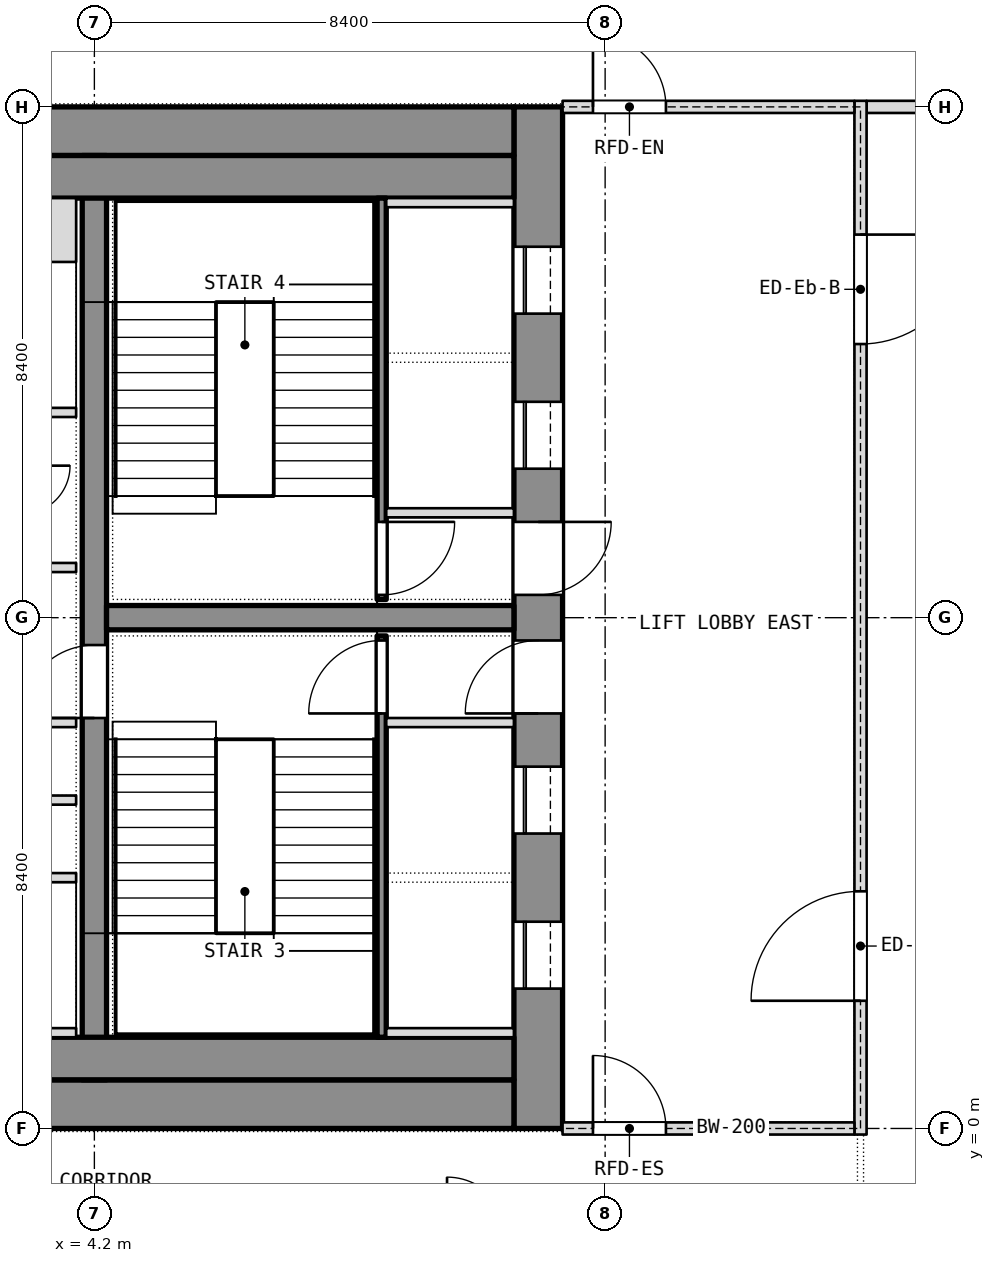
"""IFC4 building model, lengths in metres.
Left out: names, types, materials, properties, quantities, classifications, styles, units other than length and angle.
Written with IfcOpenShell. Run it as: python <this file> out.ifc"""

import sys

from ifc_helpers import new_model, si_unit, direction, frame, frame_2d, origin, place, context, subcontext, project, spatial, rectangle, extrude, element, fill, save


model = new_model("IFC4")
c1 = context("Model", 3, precision=1e-05, world=origin(), true_north=direction((0.0, 1.0)))
c2 = subcontext(c1, "Body", "Model", "MODEL_VIEW")
j1 = project(units=[si_unit("LENGTHUNIT", "METRE"), si_unit("PLANEANGLEUNIT", "RADIAN")], contexts=[c1])
p1 = place(None, origin())
s1 = spatial("IfcSite", under=j1, at=p1, CompositionType="ELEMENT")
p2 = place(p1, origin())
s2 = spatial("IfcBuilding", under=s1, at=p2, CompositionType="ELEMENT")
p3 = place(p2, frame((0.0, 0.0, 216.5)))
s3 = spatial("IfcBuildingStorey", under=s2, at=p3, CompositionType="ELEMENT", Elevation=216.5)
p4 = place(p3, frame((11.5, 0.0, 0.0), z_axis=(0.0, 0.0, 1.0), x_axis=(0.0, 1.0, 0.0)))
e1 = element("IfcWall", 1, at=p4, inside=s3, PredefinedType="SHEAR", context=c2, shape_type="SweptSolid", body=[
    extrude(rectangle(XDim=16.8, YDim=0.8, at=frame_2d((8.4, 0.0))), origin(), (0.0, 0.0, 1.0), 3.6),
])
p5 = place(p4, frame((2.3, 0.0, 0.0)))
e2 = element("IfcOpeningElement", 2, at=p5, cuts=e1, PredefinedType="OPENING", context=c2, shape_type="SweptSolid", body=[
    extrude(rectangle(XDim=1.1, YDim=2.1, at=frame_2d((0.55, 1.05))), frame((0.0, 0.4, 0.0), z_axis=(0.0, -1.0, 0.0), x_axis=(1.0, 0.0, 0.0)), (0.0, 0.0, 1.0), 0.8),
])
p6 = place(p4, frame((4.85, 0.0, 0.0)))
e3 = element("IfcOpeningElement", 3, at=p6, cuts=e1, PredefinedType="OPENING", context=c2, shape_type="SweptSolid", body=[
    extrude(rectangle(XDim=1.1, YDim=2.1, at=frame_2d((0.55, 1.05))), frame((0.0, 0.4, 0.0), z_axis=(0.0, -1.0, 0.0), x_axis=(1.0, 0.0, 0.0)), (0.0, 0.0, 1.0), 0.8),
])
p7 = place(p4, frame((6.825, 0.0, 0.0)))
e4 = element("IfcOpeningElement", 4, at=p7, cuts=e1, PredefinedType="OPENING", context=c2, shape_type="SweptSolid", body=[
    extrude(rectangle(XDim=1.2, YDim=2.1, at=frame_2d((0.6, 1.05))), frame((0.0, 0.4, 0.0), z_axis=(0.0, -1.0, 0.0), x_axis=(1.0, 0.0, 0.0)), (0.0, 0.0, 1.0), 0.8),
])
p8 = place(p4, frame((13.4, 0.0, 0.0)))
e5 = element("IfcOpeningElement", 5, at=p8, cuts=e1, PredefinedType="OPENING", context=c2, shape_type="SweptSolid", body=[
    extrude(rectangle(XDim=1.1, YDim=2.1, at=frame_2d((0.55, 1.05))), frame((0.0, 0.4, 0.0), z_axis=(0.0, -1.0, 0.0), x_axis=(1.0, 0.0, 0.0)), (0.0, 0.0, 1.0), 0.8),
])
p9 = place(p4, frame((10.85, 0.0, 0.0)))
e6 = element("IfcOpeningElement", 6, at=p9, cuts=e1, PredefinedType="OPENING", context=c2, shape_type="SweptSolid", body=[
    extrude(rectangle(XDim=1.1, YDim=2.1, at=frame_2d((0.55, 1.05))), frame((0.0, 0.4, 0.0), z_axis=(0.0, -1.0, 0.0), x_axis=(1.0, 0.0, 0.0)), (0.0, 0.0, 1.0), 0.8),
])
p10 = place(p4, frame((8.775, 0.0, 0.0)))
e7 = element("IfcOpeningElement", 7, at=p10, cuts=e1, PredefinedType="OPENING", context=c2, shape_type="SweptSolid", body=[
    extrude(rectangle(XDim=1.2, YDim=2.1, at=frame_2d((0.6, 1.05))), frame((0.0, 0.4, 0.0), z_axis=(0.0, -1.0, 0.0), x_axis=(1.0, 0.0, 0.0)), (0.0, 0.0, 1.0), 0.8),
])
p11 = place(p3, frame((-11.1, 0.4, 0.0), z_axis=(0.0, 0.0, 1.0), x_axis=(1.0, 0.0, 0.0)))
e8 = element("IfcWall", 8, at=p11, inside=s3, PredefinedType="SHEAR", context=c2, shape_type="SweptSolid", body=[
    extrude(rectangle(XDim=22.2, YDim=0.8, at=frame_2d((11.1, 0.0))), origin(), (0.0, 0.0, 1.0), 3.6),
])
p12 = place(p11, frame((10.85, 0.0, 0.0)))
e9 = element("IfcOpeningElement", 9, at=p12, cuts=e8, PredefinedType="OPENING", context=c2, shape_type="SweptSolid", body=[
    extrude(rectangle(XDim=1.4, YDim=2.1, at=frame_2d((0.7, 1.05))), frame((0.0, 0.4, 0.0), z_axis=(0.0, -1.0, 0.0), x_axis=(1.0, 0.0, 0.0)), (0.0, 0.0, 1.0), 0.8),
])
p13 = place(p3, frame((-11.1, 16.4, 0.0), z_axis=(0.0, 0.0, 1.0), x_axis=(1.0, 0.0, 0.0)))
e10 = element("IfcWall", 10, at=p13, inside=s3, PredefinedType="SHEAR", context=c2, shape_type="SweptSolid", body=[
    extrude(rectangle(XDim=22.2, YDim=0.8, at=frame_2d((11.1, 0.0))), origin(), (0.0, 0.0, 1.0), 3.6),
])
p14 = place(p13, frame((10.4, 0.0, 0.0)))
e11 = element("IfcOpeningElement", 11, at=p14, cuts=e10, PredefinedType="OPENING", context=c2, shape_type="SweptSolid", body=[
    extrude(rectangle(XDim=1.4, YDim=2.1, at=frame_2d((0.7, 1.05))), frame((0.0, 0.4, 0.0), z_axis=(0.0, -1.0, 0.0), x_axis=(1.0, 0.0, 0.0)), (0.0, 0.0, 1.0), 0.8),
])
p15 = place(p3, frame((4.2, 0.8, 0.0), z_axis=(0.0, 0.0, 1.0), x_axis=(0.0, 1.0, 0.0)))
e12 = element("IfcWall", 12, at=p15, inside=s3, PredefinedType="SHEAR", context=c2, shape_type="SweptSolid", body=[
    extrude(rectangle(XDim=15.2, YDim=0.4, at=frame_2d((7.6, 0.0))), origin(), (0.0, 0.0, 1.0), 3.6),
])
p16 = place(p15, frame((5.95, 0.0, 0.0)))
e13 = element("IfcOpeningElement", 13, at=p16, cuts=e12, PredefinedType="OPENING", context=c2, shape_type="SweptSolid", body=[
    extrude(rectangle(XDim=1.2, YDim=2.1, at=frame_2d((0.6, 1.05))), frame((0.0, 0.2, 0.0), z_axis=(0.0, -1.0, 0.0), x_axis=(1.0, 0.0, 0.0)), (0.0, 0.0, 1.0), 0.4),
])
p17 = place(p3, frame((4.4, 8.4, 0.0), z_axis=(0.0, 0.0, 1.0), x_axis=(1.0, 0.0, 0.0)))
e14 = element("IfcWall", 14, at=p17, inside=s3, PredefinedType="SHEAR", context=c2, shape_type="SweptSolid", body=[
    extrude(rectangle(XDim=6.7, YDim=0.4, at=frame_2d((3.35, 0.0))), origin(), (0.0, 0.0, 1.0), 3.6),
])
p18 = place(p3, frame((16.9, 16.8, 0.0), z_axis=(0.0, 0.0, 1.0), x_axis=(1.0, 0.0, 0.0)))
e15 = element("IfcWall", 15, at=p18, inside=s3, PredefinedType="PARTITIONING", context=c2, shape_type="SweptSolid", body=[
    extrude(rectangle(XDim=1.5, YDim=0.2, at=frame_2d((0.75, 0.0))), origin(), (0.0, 0.0, 1.0), 2.94),
])
p19 = place(p3, frame((1.15, 1.15, 0.0), z_axis=(0.0, 0.0, 1.0), x_axis=(1.0, 0.0, 0.0)))
e16 = element("IfcWall", 16, at=p19, inside=s3, PredefinedType="PARTITIONING", context=c2, shape_type="SweptSolid", body=[
    extrude(rectangle(XDim=9.95, YDim=0.7, at=frame_2d((4.975, 0.0))), origin(), (0.0, 0.0, 1.0), 3.34),
])
p20 = place(p3, frame((0.9, 15.65, 0.0), z_axis=(0.0, 0.0, 1.0), x_axis=(1.0, 0.0, 0.0)))
e17 = element("IfcWall", 17, at=p20, inside=s3, PredefinedType="PARTITIONING", context=c2, shape_type="SweptSolid", body=[
    extrude(rectangle(XDim=10.2, YDim=0.7, at=frame_2d((5.1, 0.0))), origin(), (0.0, 0.0, 1.0), 3.34),
])
p21 = place(p3, frame((8.925, 1.5, 0.0), z_axis=(0.0, 0.0, 1.0), x_axis=(0.0, 1.0, 0.0)))
e18 = element("IfcWall", 18, at=p21, inside=s3, PredefinedType="SHEAR", context=c2, shape_type="SweptSolid", body=[
    extrude(rectangle(XDim=6.6, YDim=0.15, at=frame_2d((3.3, 0.0))), origin(), (0.0, 0.0, 1.0), 3.34),
])
p22 = place(p21, frame((5.325, 0.0, 0.0)))
e19 = element("IfcOpeningElement", 19, at=p22, cuts=e18, PredefinedType="OPENING", context=c2, shape_type="SweptSolid", body=[
    extrude(rectangle(XDim=1.2, YDim=2.1, at=frame_2d((0.6, 1.05))), frame((0.0, 0.075, 0.0), z_axis=(0.0, -1.0, 0.0), x_axis=(1.0, 0.0, 0.0)), (0.0, 0.0, 1.0), 0.15),
])
for number, where, z_axis, x_axis in (
    (20, (9.0, 6.675, 0.0), (0.0, 0.0, 1.0), (1.0, 0.0, 0.0)),
    (21, (9.0, 1.575, 0.0), (0.0, 0.0, 1.0), (1.0, 0.0, 0.0)),
):
    element("IfcWall", number, at=place(p3, frame(where, z_axis=z_axis, x_axis=x_axis)), inside=s3, PredefinedType="SHEAR", context=c2, shape_type="SweptSolid", body=[
        extrude(rectangle(XDim=2.1, YDim=0.15, at=frame_2d((1.05, 0.0))), origin(), (0.0, 0.0, 1.0), 3.6),
    ])
p23 = place(p3, frame((8.925, 8.7, 0.0), z_axis=(0.0, 0.0, 1.0), x_axis=(0.0, 1.0, 0.0)))
e22 = element("IfcWall", 22, at=p23, inside=s3, PredefinedType="SHEAR", context=c2, shape_type="SweptSolid", body=[
    extrude(rectangle(XDim=6.6, YDim=0.15, at=frame_2d((3.3, 0.0))), origin(), (0.0, 0.0, 1.0), 3.34),
])
p24 = place(p23, frame((0.075, 0.0, 0.0)))
e23 = element("IfcOpeningElement", 23, at=p24, cuts=e22, PredefinedType="OPENING", context=c2, shape_type="SweptSolid", body=[
    extrude(rectangle(XDim=1.2, YDim=2.1, at=frame_2d((0.6, 1.05))), frame((0.0, 0.075, 0.0), z_axis=(0.0, -1.0, 0.0), x_axis=(1.0, 0.0, 0.0)), (0.0, 0.0, 1.0), 0.15),
])
for number, where, z_axis, x_axis in (
    (24, (9.0, 10.125, 0.0), (0.0, 0.0, 1.0), (1.0, 0.0, 0.0)),
    (25, (9.0, 15.225, 0.0), (0.0, 0.0, 1.0), (1.0, 0.0, 0.0)),
):
    element("IfcWall", number, at=place(p3, frame(where, z_axis=z_axis, x_axis=x_axis)), inside=s3, PredefinedType="SHEAR", context=c2, shape_type="SweptSolid", body=[
        extrude(rectangle(XDim=2.1, YDim=0.15, at=frame_2d((1.05, 0.0))), origin(), (0.0, 0.0, 1.0), 3.6),
    ])
p25 = place(p3, frame((-3.9, 4.125, 0.0), z_axis=(0.0, 0.0, 1.0), x_axis=(1.0, 0.0, 0.0)))
e26 = element("IfcWall", 26, at=p25, inside=s3, PredefinedType="PARTITIONING", context=c2, shape_type="SweptSolid", body=[
    extrude(rectangle(XDim=7.8, YDim=0.15, at=frame_2d((3.9, 0.0))), origin(), (0.0, 0.0, 1.0), 3.34),
])
p26 = place(p25, frame((3.75, 0.0, 0.0)))
e27 = element("IfcOpeningElement", 27, at=p26, cuts=e26, PredefinedType="OPENING", context=c2, shape_type="SweptSolid", body=[
    extrude(rectangle(XDim=1.2, YDim=2.1, at=frame_2d((0.6, 1.05))), frame((0.0, 0.075, 0.0), z_axis=(0.0, -1.0, 0.0), x_axis=(1.0, 0.0, 0.0)), (0.0, 0.0, 1.0), 0.15),
])
p27 = place(p3, frame((-3.9, 11.775, 0.0), z_axis=(0.0, 0.0, 1.0), x_axis=(1.0, 0.0, 0.0)))
e28 = element("IfcWall", 28, at=p27, inside=s3, PredefinedType="PARTITIONING", context=c2, shape_type="SweptSolid", body=[
    extrude(rectangle(XDim=7.8, YDim=0.15, at=frame_2d((3.9, 0.0))), origin(), (0.0, 0.0, 1.0), 3.34),
])
p28 = place(p27, frame((3.3, 0.0, 0.0)))
e29 = element("IfcOpeningElement", 29, at=p28, cuts=e28, PredefinedType="OPENING", context=c2, shape_type="SweptSolid", body=[
    extrude(rectangle(XDim=1.2, YDim=2.1, at=frame_2d((0.6, 1.05))), frame((0.0, 0.075, 0.0), z_axis=(0.0, -1.0, 0.0), x_axis=(1.0, 0.0, 0.0)), (0.0, 0.0, 1.0), 0.15),
])
p29 = place(p3, frame((1.65, 1.575, 0.0), z_axis=(0.0, 0.0, 1.0), x_axis=(1.0, 0.0, 0.0)))
e30 = element("IfcWall", 30, at=p29, inside=s3, PredefinedType="SHEAR", context=c2, shape_type="SweptSolid", body=[
    extrude(rectangle(XDim=2.25, YDim=0.15, at=frame_2d((1.125, 0.0))), origin(), (0.0, 0.0, 1.0), 3.6),
])
p30 = place(p3, frame((1.65, 14.775, 0.0), z_axis=(0.0, 0.0, 1.0), x_axis=(1.0, 0.0, 0.0)))
e31 = element("IfcWall", 31, at=p30, inside=s3, PredefinedType="SHEAR", context=c2, shape_type="SweptSolid", body=[
    extrude(rectangle(XDim=2.25, YDim=1.05, at=frame_2d((1.125, 0.0))), origin(), (0.0, 0.0, 1.0), 3.6),
])
for number, where, z_axis, x_axis in (
    (32, (1.65, 6.675, 0.0), (0.0, 0.0, 1.0), (1.0, 0.0, 0.0)),
    (33, (1.65, 9.225, 0.0), (0.0, 0.0, 1.0), (1.0, 0.0, 0.0)),
):
    element("IfcWall", number, at=place(p3, frame(where, z_axis=z_axis, x_axis=x_axis)), inside=s3, PredefinedType="PARTITIONING", context=c2, shape_type="SweptSolid", body=[
        extrude(rectangle(XDim=2.25, YDim=0.15, at=frame_2d((1.125, 0.0))), origin(), (0.0, 0.0, 1.0), 3.34),
    ])
p31 = place(p3, frame((1.8, 5.4, 0.0), z_axis=(0.0, 0.0, 1.0), x_axis=(1.0, 0.0, 0.0)))
e34 = element("IfcWall", 34, at=p31, inside=s3, PredefinedType="PARTITIONING", context=c2, shape_type="SweptSolid", body=[
    extrude(rectangle(XDim=2.1, YDim=0.15, at=frame_2d((1.05, 0.0))), origin(), (0.0, 0.0, 1.0), 3.34),
])
p32 = place(p3, frame((16.8, -0.1, 0.0), z_axis=(0.0, 0.0, 1.0), x_axis=(0.0, 1.0, 0.0)))
e35 = element("IfcWall", 35, at=p32, inside=s3, PredefinedType="PARTITIONING", context=c2, shape_type="SweptSolid", body=[
    extrude(rectangle(XDim=17.0, YDim=0.2, at=frame_2d((8.5, 0.0))), origin(), (0.0, 0.0, 1.0), 3.34),
])
p33 = place(p32, frame((2.2, 0.0, 0.0)))
e36 = element("IfcOpeningElement", 36, at=p33, cuts=e35, PredefinedType="OPENING", context=c2, shape_type="SweptSolid", body=[
    extrude(rectangle(XDim=1.8, YDim=2.1, at=frame_2d((0.9, 1.05))), frame((0.0, 0.1, 0.0), z_axis=(0.0, -1.0, 0.0), x_axis=(1.0, 0.0, 0.0)), (0.0, 0.0, 1.0), 0.2),
])
p34 = place(p32, frame((13.0, 0.0, 0.0)))
e37 = element("IfcOpeningElement", 37, at=p34, cuts=e35, PredefinedType="OPENING", context=c2, shape_type="SweptSolid", body=[
    extrude(rectangle(XDim=1.8, YDim=2.1, at=frame_2d((0.9, 1.05))), frame((0.0, 0.1, 0.0), z_axis=(0.0, -1.0, 0.0), x_axis=(1.0, 0.0, 0.0)), (0.0, 0.0, 1.0), 0.2),
])
p35 = place(p3, frame((11.9, 0.0, 0.0), z_axis=(0.0, 0.0, 1.0), x_axis=(1.0, 0.0, 0.0)))
e38 = element("IfcWall", 38, at=p35, inside=s3, PredefinedType="PARTITIONING", context=c2, shape_type="SweptSolid", body=[
    extrude(rectangle(XDim=4.8, YDim=0.2, at=frame_2d((2.4, 0.0))), origin(), (0.0, 0.0, 1.0), 2.94),
])
p36 = place(p35, frame((0.5, 0.0, 0.0)))
e39 = element("IfcOpeningElement", 39, at=p36, cuts=e38, PredefinedType="OPENING", context=c2, shape_type="SweptSolid", body=[
    extrude(rectangle(XDim=1.2, YDim=2.1, at=frame_2d((0.6, 1.05))), frame((0.0, 0.1, 0.0), z_axis=(0.0, -1.0, 0.0), x_axis=(1.0, 0.0, 0.0)), (0.0, 0.0, 1.0), 0.2),
])
p37 = place(p3, frame((11.9, 16.8, 0.0), z_axis=(0.0, 0.0, 1.0), x_axis=(1.0, 0.0, 0.0)))
e40 = element("IfcWall", 40, at=p37, inside=s3, PredefinedType="PARTITIONING", context=c2, shape_type="SweptSolid", body=[
    extrude(rectangle(XDim=4.8, YDim=0.2, at=frame_2d((2.4, 0.0))), origin(), (0.0, 0.0, 1.0), 2.94),
])
p38 = place(p37, frame((0.5, 0.0, 0.0)))
e41 = element("IfcOpeningElement", 41, at=p38, cuts=e40, PredefinedType="OPENING", context=c2, shape_type="SweptSolid", body=[
    extrude(rectangle(XDim=1.2, YDim=2.1, at=frame_2d((0.6, 1.05))), frame((0.0, 0.1, 0.0), z_axis=(0.0, -1.0, 0.0), x_axis=(1.0, 0.0, 0.0)), (0.0, 0.0, 1.0), 0.2),
])
p39 = place(p5, origin())
e42 = element("IfcDoor", 42, at=p39, inside=s3, OperationType="SLIDING_TO_LEFT", PredefinedType="DOOR", context=c2, shape_type="SweptSolid", body=[
    extrude(rectangle(XDim=1.1, YDim=2.1, at=frame_2d((0.55, 1.05))), frame((0.0, 0.025, 0.0), z_axis=(0.0, -1.0, 0.0), x_axis=(1.0, 0.0, 0.0)), (0.0, 0.0, 1.0), 0.05),
])
fill(e2, e42)
p40 = place(p6, origin())
e43 = element("IfcDoor", 43, at=p40, inside=s3, OperationType="SLIDING_TO_LEFT", PredefinedType="DOOR", context=c2, shape_type="SweptSolid", body=[
    extrude(rectangle(XDim=1.1, YDim=2.1, at=frame_2d((0.55, 1.05))), frame((0.0, 0.025, 0.0), z_axis=(0.0, -1.0, 0.0), x_axis=(1.0, 0.0, 0.0)), (0.0, 0.0, 1.0), 0.05),
])
fill(e3, e43)
p41 = place(p7, origin())
e44 = element("IfcDoor", 44, at=p41, inside=s3, OperationType="SINGLE_SWING_LEFT", PredefinedType="DOOR", context=c2, shape_type="SweptSolid", body=[
    extrude(rectangle(XDim=1.2, YDim=2.1, at=frame_2d((0.6, 1.05))), frame((0.0, 0.025, 0.0), z_axis=(0.0, -1.0, 0.0), x_axis=(1.0, 0.0, 0.0)), (0.0, 0.0, 1.0), 0.05),
])
fill(e4, e44)
p42 = place(p22, origin())
e45 = element("IfcDoor", 45, at=p42, inside=s3, OperationType="SINGLE_SWING_LEFT", PredefinedType="DOOR", context=c2, shape_type="SweptSolid", body=[
    extrude(rectangle(XDim=1.2, YDim=2.1, at=frame_2d((0.6, 1.05))), frame((0.0, 0.025, 0.0), z_axis=(0.0, -1.0, 0.0), x_axis=(1.0, 0.0, 0.0)), (0.0, 0.0, 1.0), 0.05),
])
fill(e19, e45)
p43 = place(p8, origin())
e46 = element("IfcDoor", 46, at=p43, inside=s3, OperationType="SLIDING_TO_LEFT", PredefinedType="DOOR", context=c2, shape_type="SweptSolid", body=[
    extrude(rectangle(XDim=1.1, YDim=2.1, at=frame_2d((0.55, 1.05))), frame((0.0, 0.025, 0.0), z_axis=(0.0, -1.0, 0.0), x_axis=(1.0, 0.0, 0.0)), (0.0, 0.0, 1.0), 0.05),
])
fill(e5, e46)
p44 = place(p9, origin())
e47 = element("IfcDoor", 47, at=p44, inside=s3, OperationType="SLIDING_TO_LEFT", PredefinedType="DOOR", context=c2, shape_type="SweptSolid", body=[
    extrude(rectangle(XDim=1.1, YDim=2.1, at=frame_2d((0.55, 1.05))), frame((0.0, 0.025, 0.0), z_axis=(0.0, -1.0, 0.0), x_axis=(1.0, 0.0, 0.0)), (0.0, 0.0, 1.0), 0.05),
])
fill(e6, e47)
p45 = place(p10, origin())
e48 = element("IfcDoor", 48, at=p45, inside=s3, OperationType="SINGLE_SWING_LEFT", PredefinedType="DOOR", context=c2, shape_type="SweptSolid", body=[
    extrude(rectangle(XDim=1.2, YDim=2.1, at=frame_2d((0.6, 1.05))), frame((0.0, 0.025, 0.0), z_axis=(0.0, -1.0, 0.0), x_axis=(1.0, 0.0, 0.0)), (0.0, 0.0, 1.0), 0.05),
])
fill(e7, e48)
p46 = place(p24, origin())
e49 = element("IfcDoor", 49, at=p46, inside=s3, OperationType="SINGLE_SWING_LEFT", PredefinedType="DOOR", context=c2, shape_type="SweptSolid", body=[
    extrude(rectangle(XDim=1.2, YDim=2.1, at=frame_2d((0.6, 1.05))), frame((0.0, 0.025, 0.0), z_axis=(0.0, -1.0, 0.0), x_axis=(1.0, 0.0, 0.0)), (0.0, 0.0, 1.0), 0.05),
])
fill(e23, e49)
p47 = place(p16, origin())
e50 = element("IfcDoor", 50, at=p47, inside=s3, OperationType="SINGLE_SWING_LEFT", PredefinedType="DOOR", context=c2, shape_type="SweptSolid", body=[
    extrude(rectangle(XDim=1.2, YDim=2.1, at=frame_2d((0.6, 1.05))), frame((0.0, 0.025, 0.0), z_axis=(0.0, -1.0, 0.0), x_axis=(1.0, 0.0, 0.0)), (0.0, 0.0, 1.0), 0.05),
])
fill(e13, e50)
p48 = place(p33, origin())
e51 = element("IfcDoor", 51, at=p48, inside=s3, OperationType="DOUBLE_DOOR_SINGLE_SWING", PredefinedType="DOOR", context=c2, shape_type="SweptSolid", body=[
    extrude(rectangle(XDim=1.8, YDim=2.1, at=frame_2d((0.9, 1.05))), frame((0.0, 0.025, 0.0), z_axis=(0.0, -1.0, 0.0), x_axis=(1.0, 0.0, 0.0)), (0.0, 0.0, 1.0), 0.05),
])
fill(e36, e51)
p49 = place(p34, origin())
e52 = element("IfcDoor", 52, at=p49, inside=s3, OperationType="DOUBLE_DOOR_SINGLE_SWING", PredefinedType="DOOR", context=c2, shape_type="SweptSolid", body=[
    extrude(rectangle(XDim=1.8, YDim=2.1, at=frame_2d((0.9, 1.05))), frame((0.0, 0.025, 0.0), z_axis=(0.0, -1.0, 0.0), x_axis=(1.0, 0.0, 0.0)), (0.0, 0.0, 1.0), 0.05),
])
fill(e37, e52)
p50 = place(p36, origin())
e53 = element("IfcDoor", 53, at=p50, inside=s3, OperationType="SINGLE_SWING_LEFT", PredefinedType="DOOR", context=c2, shape_type="SweptSolid", body=[
    extrude(rectangle(XDim=1.2, YDim=2.1, at=frame_2d((0.6, 1.05))), frame((0.0, 0.025, 0.0), z_axis=(0.0, -1.0, 0.0), x_axis=(1.0, 0.0, 0.0)), (0.0, 0.0, 1.0), 0.05),
])
fill(e39, e53)
p51 = place(p38, origin())
e54 = element("IfcDoor", 54, at=p51, inside=s3, OperationType="SINGLE_SWING_LEFT", PredefinedType="DOOR", context=c2, shape_type="SweptSolid", body=[
    extrude(rectangle(XDim=1.2, YDim=2.1, at=frame_2d((0.6, 1.05))), frame((0.0, 0.025, 0.0), z_axis=(0.0, -1.0, 0.0), x_axis=(1.0, 0.0, 0.0)), (0.0, 0.0, 1.0), 0.05),
])
fill(e41, e54)
save(model, sys.argv[1])
